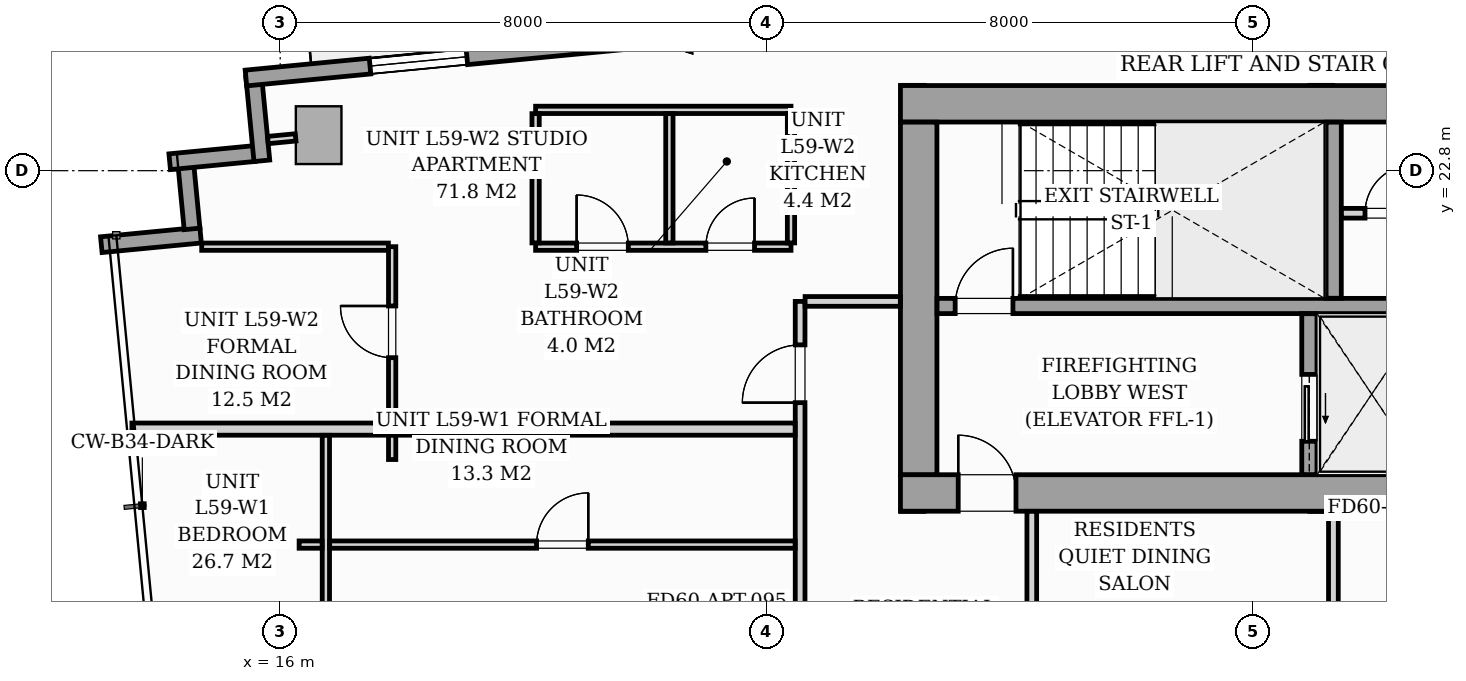
"""IFC4 building model, lengths in metres.
Left out: names, types, materials, properties, quantities, classifications, styles, units other than length and angle.
Written with IfcOpenShell. Run it as: python <this file> out.ifc"""

import sys

from ifc_helpers import new_model, si_unit, direction, frame, frame_2d, origin, origin_2d, place, context, subcontext, project, spatial, rectangle, i_section, extrude, source, transform, mapped, element, fill, save


model = new_model("IFC4")
c1 = context("Model", 3, precision=1e-05, world=origin(), true_north=direction((0.0, 1.0)))
c2 = subcontext(c1, "Body", "Model", "MODEL_VIEW")
j1 = project(units=[si_unit("LENGTHUNIT", "METRE"), si_unit("PLANEANGLEUNIT", "RADIAN")], contexts=[c1])
p1 = place(None, origin())
s1 = spatial("IfcSite", under=j1, at=p1, CompositionType="ELEMENT")
p2 = place(p1, origin())
s2 = spatial("IfcBuilding", under=s1, at=p2, CompositionType="ELEMENT")
p3 = place(p2, frame((0.0, 0.0, 205.0)))
s3 = spatial("IfcBuildingStorey", under=s2, at=p3, CompositionType="ELEMENT", Elevation=205.0)
m1 = source(origin(), c2, "Body", "SweptSolid", [
    extrude(i_section(OverallWidth=0.416, OverallDepth=0.446, WebThickness=0.039, FlangeThickness=0.063, FilletRadius=0.018, at=origin_2d()), origin(), (0.0, 0.0, 1.0), 3.196),
])
for number, where, z_axis, x_axis in (
    (1, (26.4, 17.4, 0.002), (0.0, 0.0, 1.0), (1.0, 0.0, 0.0)),
    (2, (33.12, 17.4, 0.002), (0.0, 0.0, 1.0), (1.0, 0.0, 0.0)),
    (3, (26.4, 24.0, 0.002), (0.0, 0.0, 1.0), (1.0, 0.0, 0.0)),
    (4, (33.12, 24.0, 0.002), (0.0, 0.0, 1.0), (1.0, 0.0, 0.0)),
):
    element("IfcColumn", number, at=place(p3, frame(where, z_axis=z_axis, x_axis=x_axis)), inside=s3, PredefinedType="PILASTER", context=c2, shape_type="MappedRepresentation", body=[
        mapped(m1, transform((0.0, 0.0, 0.0), scale=1.0)),
    ])
m2 = source(origin(), c2, "Body", "SweptSolid", [
    extrude(rectangle(XDim=0.75, YDim=0.95, at=origin_2d()), origin(), (0.0, 0.0, 1.0), 3.196),
])
p4 = place(p3, frame((16.632, 23.384, 0.002), z_axis=(0.0, 0.0, 1.0), x_axis=(0.995396198367, 0.09584575252, 0.0)))
e5 = element("IfcColumn", 5, at=p4, inside=s3, PredefinedType="COLUMN", context=c2, shape_type="MappedRepresentation", body=[
    mapped(m2, transform((0.0, 0.0, 0.0), scale=1.0)),
])
p5 = place(p3, frame((13.058, 21.583, 0.0), z_axis=(0.0, 0.0, 1.0), x_axis=(0.995394563142, 0.095862733462, 0.0)))
e6 = element("IfcWall", 6, at=p5, inside=s3, PredefinedType="STANDARD", context=c2, shape_type="SweptSolid", body=[
    extrude(rectangle(XDim=1.64, YDim=0.26, at=frame_2d((0.82, 0.0))), origin(), (0.0, 0.0, 1.0), 2.94),
])
p6 = place(p3, frame((14.55, 21.843, 0.0), z_axis=(0.0, 0.0, 1.0), x_axis=(-0.09576095695, 0.995404359607, 0.0)))
e7 = element("IfcWall", 7, at=p6, inside=s3, PredefinedType="STANDARD", context=c2, shape_type="SweptSolid", body=[
    extrude(rectangle(XDim=1.15, YDim=0.26, at=frame_2d((0.575, 0.0))), origin(), (0.0, 0.0, 1.0), 2.94),
])
p7 = place(p3, frame((14.183, 22.947, 0.0), z_axis=(0.0, 0.0, 1.0), x_axis=(0.99540614245, 0.095742423056, 0.0)))
e8 = element("IfcWall", 8, at=p7, inside=s3, PredefinedType="STANDARD", context=c2, shape_type="SweptSolid", body=[
    extrude(rectangle(XDim=1.395, YDim=0.26, at=frame_2d((0.697, 0.0))), origin(), (0.0, 0.0, 1.0), 2.94),
])
p8 = place(p3, frame((15.698, 22.963, 0.0), z_axis=(0.0, 0.0, 1.0), x_axis=(-0.09589913835, 0.995391056452, 0.0)))
e9 = element("IfcWall", 9, at=p8, inside=s3, PredefinedType="STANDARD", context=c2, shape_type="SweptSolid", body=[
    extrude(rectangle(XDim=1.395, YDim=0.26, at=frame_2d((0.698, 0.0))), origin(), (0.0, 0.0, 1.0), 2.94),
])
p9 = place(p3, frame((15.437, 24.324, 0.0), z_axis=(0.0, 0.0, 1.0), x_axis=(0.995395627913, 0.095851676732, 0.0)))
e10 = element("IfcWall", 10, at=p9, inside=s3, PredefinedType="STANDARD", context=c2, shape_type="SweptSolid", body=[
    extrude(rectangle(XDim=16.1, YDim=0.26, at=frame_2d((8.05, 0.0))), origin(), (0.0, 0.0, 1.0), 2.94),
])
p10 = place(p9, frame((6.749, 0.0, 0.0)))
e11 = element("IfcOpeningElement", 11, at=p10, cuts=e10, PredefinedType="OPENING", context=c2, shape_type="SweptSolid", body=[
    extrude(rectangle(XDim=1.8, YDim=2.06, at=frame_2d((0.9, 1.03))), frame((0.0, 0.14, 0.0), z_axis=(0.0, -1.0, 0.0), x_axis=(1.0, 0.0, 0.0)), (0.0, 0.0, 1.0), 0.28),
])
p11 = place(p9, frame((2.05, 0.0, 0.65)))
e12 = element("IfcOpeningElement", 12, at=p11, cuts=e10, PredefinedType="OPENING", context=c2, shape_type="SweptSolid", body=[
    extrude(rectangle(XDim=1.6, YDim=1.5, at=frame_2d((0.8, 0.75))), frame((0.0, 0.14, 0.0), z_axis=(0.0, -1.0, 0.0), x_axis=(1.0, 0.0, 0.0)), (0.0, 0.0, 1.0), 0.28),
])
p12 = place(p3, frame((26.2, 17.5, 0.0), z_axis=(0.0, 0.0, 1.0), x_axis=(1.0, 0.0, 0.0)))
e13 = element("IfcWall", 13, at=p12, inside=s3, PredefinedType="SHEAR", context=c2, shape_type="SweptSolid", body=[
    extrude(rectangle(XDim=19.6, YDim=0.6, at=frame_2d((9.8, 0.0))), origin(), (0.0, 0.0, 1.0), 3.2),
])
p13 = place(p12, frame((0.95, 0.0, 0.0)))
e14 = element("IfcOpeningElement", 14, at=p13, cuts=e13, PredefinedType="OPENING", context=c2, shape_type="SweptSolid", body=[
    extrude(rectangle(XDim=0.95, YDim=2.06, at=frame_2d((0.475, 1.03))), frame((0.0, 0.31, 0.0), z_axis=(0.0, -1.0, 0.0), x_axis=(1.0, 0.0, 0.0)), (0.0, 0.0, 1.0), 0.62),
])
p14 = place(p12, frame((9.38, 0.0, 0.0)))
e15 = element("IfcOpeningElement", 15, at=p14, cuts=e13, PredefinedType="OPENING", context=c2, shape_type="SweptSolid", body=[
    extrude(rectangle(XDim=0.85, YDim=2.0, at=frame_2d((0.425, 1.0))), frame((0.0, 0.31, 0.0), z_axis=(0.0, -1.0, 0.0), x_axis=(1.0, 0.0, 0.0)), (0.0, 0.0, 1.0), 0.62),
])
p15 = place(p12, frame((17.55, 0.0, 0.0)))
e16 = element("IfcOpeningElement", 16, at=p15, cuts=e13, PredefinedType="OPENING", context=c2, shape_type="SweptSolid", body=[
    extrude(rectangle(XDim=0.95, YDim=2.06, at=frame_2d((0.475, 1.03))), frame((0.0, 0.31, 0.0), z_axis=(0.0, -1.0, 0.0), x_axis=(1.0, 0.0, 0.0)), (0.0, 0.0, 1.0), 0.62),
])
p16 = place(p3, frame((26.2, 23.9, 0.0), z_axis=(0.0, 0.0, 1.0), x_axis=(1.0, 0.0, 0.0)))
e17 = element("IfcWall", 17, at=p16, inside=s3, PredefinedType="SHEAR", context=c2, shape_type="SweptSolid", body=[
    extrude(rectangle(XDim=19.6, YDim=0.6, at=frame_2d((9.8, 0.0))), origin(), (0.0, 0.0, 1.0), 3.2),
])
p17 = place(p3, frame((26.5, 17.802, 0.0), z_axis=(0.0, 0.0, 1.0), x_axis=(0.0, 1.0, 0.0)))
e18 = element("IfcWall", 18, at=p17, inside=s3, PredefinedType="SHEAR", context=c2, shape_type="SweptSolid", body=[
    extrude(rectangle(XDim=5.796, YDim=0.6, at=frame_2d((2.898, 0.0))), origin(), (0.0, 0.0, 1.0), 3.2),
])
p18 = place(p3, frame((26.802, 20.575, 0.0), z_axis=(0.0, 0.0, 1.0), x_axis=(1.0, 0.0, 0.0)))
e19 = element("IfcWall", 19, at=p18, inside=s3, PredefinedType="SOLIDWALL", context=c2, shape_type="SweptSolid", body=[
    extrude(rectangle(XDim=8.148, YDim=0.25, at=frame_2d((4.074, 0.0))), origin(), (0.0, 0.0, 1.0), 3.2),
])
p19 = place(p18, frame((0.298, 0.0, 0.0)))
e20 = element("IfcOpeningElement", 20, at=p19, cuts=e19, PredefinedType="OPENING", context=c2, shape_type="SweptSolid", body=[
    extrude(rectangle(XDim=0.95, YDim=2.06, at=frame_2d((0.475, 1.03))), frame((0.0, 0.135, 0.0), z_axis=(0.0, -1.0, 0.0), x_axis=(1.0, 0.0, 0.0)), (0.0, 0.0, 1.0), 0.27),
])
p20 = place(p3, frame((33.325, 20.702, 0.0), z_axis=(0.0, 0.0, 1.0), x_axis=(0.0, 1.0, 0.0)))
e21 = element("IfcWall", 21, at=p20, inside=s3, PredefinedType="SOLIDWALL", context=c2, shape_type="SweptSolid", body=[
    extrude(rectangle(XDim=2.896, YDim=0.25, at=frame_2d((1.448, 0.0))), origin(), (0.0, 0.0, 1.0), 3.2),
])
p21 = place(p3, frame((32.925, 17.802, 0.0), z_axis=(0.0, 0.0, 1.0), x_axis=(0.0, 1.0, 0.0)))
e22 = element("IfcWall", 22, at=p21, inside=s3, PredefinedType="SOLIDWALL", context=c2, shape_type="SweptSolid", body=[
    extrude(rectangle(XDim=2.646, YDim=0.25, at=frame_2d((1.323, 0.0))), origin(), (0.0, 0.0, 1.0), 3.2),
])
p22 = place(p21, frame((0.548, 0.0, 0.0)))
e23 = element("IfcOpeningElement", 23, at=p22, cuts=e22, PredefinedType="OPENING", context=c2, shape_type="SweptSolid", body=[
    extrude(rectangle(XDim=1.1, YDim=2.08, at=frame_2d((0.55, 1.04))), frame((0.0, 0.135, 0.0), z_axis=(0.0, -1.0, 0.0), x_axis=(1.0, 0.0, 0.0)), (0.0, 0.0, 1.0), 0.27),
])
p23 = place(p3, frame((33.452, 22.1, 0.0), z_axis=(0.0, 0.0, 1.0), x_axis=(1.0, 0.0, 0.0)))
e24 = element("IfcWall", 24, at=p23, inside=s3, PredefinedType="PARTITIONING", context=c2, shape_type="SweptSolid", body=[
    extrude(rectangle(XDim=5.096, YDim=0.16, at=frame_2d((2.548, 0.0))), origin(), (0.0, 0.0, 1.0), 2.94),
])
p24 = place(p23, frame((0.388, 0.0, 0.0)))
e25 = element("IfcOpeningElement", 25, at=p24, cuts=e24, PredefinedType="OPENING", context=c2, shape_type="SweptSolid", body=[
    extrude(rectangle(XDim=0.8, YDim=2.05, at=frame_2d((0.4, 1.025))), frame((0.0, 0.09, 0.0), z_axis=(0.0, -1.0, 0.0), x_axis=(1.0, 0.0, 0.0)), (0.0, 0.0, 1.0), 0.18),
])
p25 = place(p23, frame((2.148, 0.0, 0.0)))
e26 = element("IfcOpeningElement", 26, at=p25, cuts=e24, PredefinedType="OPENING", context=c2, shape_type="SweptSolid", body=[
    extrude(rectangle(XDim=0.8, YDim=2.05, at=frame_2d((0.4, 1.025))), frame((0.0, 0.09, 0.0), z_axis=(0.0, -1.0, 0.0), x_axis=(1.0, 0.0, 0.0)), (0.0, 0.0, 1.0), 0.18),
])
p26 = place(p23, frame((3.908, 0.0, 0.0)))
e27 = element("IfcOpeningElement", 27, at=p26, cuts=e24, PredefinedType="OPENING", context=c2, shape_type="SweptSolid", body=[
    extrude(rectangle(XDim=0.8, YDim=2.05, at=frame_2d((0.4, 1.025))), frame((0.0, 0.09, 0.0), z_axis=(0.0, -1.0, 0.0), x_axis=(1.0, 0.0, 0.0)), (0.0, 0.0, 1.0), 0.18),
])
p27 = place(p3, frame((24.55, 13.362, 0.0), z_axis=(0.0, 0.0, 1.0), x_axis=(0.0, 1.0, 0.0)))
e28 = element("IfcWall", 28, at=p27, inside=s3, PredefinedType="PARTITIONING", context=c2, shape_type="SweptSolid", body=[
    extrude(rectangle(XDim=7.288, YDim=0.16, at=frame_2d((3.644, 0.0))), origin(), (0.0, 0.0, 1.0), 2.94),
])
p28 = place(p27, frame((0.493, 0.0, 0.0)))
e29 = element("IfcOpeningElement", 29, at=p28, cuts=e28, PredefinedType="OPENING", context=c2, shape_type="SweptSolid", body=[
    extrude(rectangle(XDim=0.95, YDim=2.06, at=frame_2d((0.475, 1.03))), frame((0.0, 0.09, 0.0), z_axis=(0.0, -1.0, 0.0), x_axis=(1.0, 0.0, 0.0)), (0.0, 0.0, 1.0), 0.18),
])
p29 = place(p27, frame((5.623, 0.0, 0.0)))
e30 = element("IfcOpeningElement", 30, at=p29, cuts=e28, PredefinedType="OPENING", context=c2, shape_type="SweptSolid", body=[
    extrude(rectangle(XDim=0.95, YDim=2.06, at=frame_2d((0.475, 1.03))), frame((0.0, 0.09, 0.0), z_axis=(0.0, -1.0, 0.0), x_axis=(1.0, 0.0, 0.0)), (0.0, 0.0, 1.0), 0.18),
])
p30 = place(p3, frame((24.632, 20.65, 0.0), z_axis=(0.0, 0.0, 1.0), x_axis=(1.0, 0.0, 0.0)))
e31 = element("IfcWall", 31, at=p30, inside=s3, PredefinedType="PARTITIONING", context=c2, shape_type="SweptSolid", body=[
    extrude(rectangle(XDim=1.566, YDim=0.16, at=frame_2d((0.783, 0.0))), origin(), (0.0, 0.0, 1.0), 2.94),
])
p31 = place(p3, frame((13.561, 18.55, 0.0), z_axis=(0.0, 0.0, 1.0), x_axis=(1.0, 0.0, 0.0)))
e32 = element("IfcWall", 32, at=p31, inside=s3, PredefinedType="PARTITIONING", context=c2, shape_type="SweptSolid", body=[
    extrude(rectangle(XDim=10.907, YDim=0.2, at=frame_2d((5.453, 0.0))), origin(), (0.0, 0.0, 1.0), 2.94),
])
p32 = place(p3, frame((16.751, 7.615, 0.0), z_axis=(0.0, 0.0, 1.0), x_axis=(0.0, 1.0, 0.0)))
e33 = element("IfcWall", 33, at=p32, inside=s3, PredefinedType="PARTITIONING", context=c2, shape_type="SweptSolid", body=[
    extrude(rectangle(XDim=10.833, YDim=0.12, at=frame_2d((5.417, 0.0))), origin(), (0.0, 0.0, 1.0), 2.94),
])
p33 = place(p32, frame((4.849, 0.0, 0.0)))
e34 = element("IfcOpeningElement", 34, at=p33, cuts=e33, PredefinedType="OPENING", context=c2, shape_type="SweptSolid", body=[
    extrude(rectangle(XDim=0.85, YDim=2.05, at=frame_2d((0.425, 1.025))), frame((0.0, 0.07, 0.0), z_axis=(0.0, -1.0, 0.0), x_axis=(1.0, 0.0, 0.0)), (0.0, 0.0, 1.0), 0.14),
])
p34 = place(p3, frame((16.311, 16.651, 0.0), z_axis=(0.0, 0.0, 1.0), x_axis=(1.0, 0.0, 0.0)))
e35 = element("IfcWall", 35, at=p34, inside=s3, PredefinedType="PARTITIONING", context=c2, shape_type="SweptSolid", body=[
    extrude(rectangle(XDim=0.378, YDim=0.12, at=frame_2d((0.189, 0.0))), origin(), (0.0, 0.0, 1.0), 2.94),
])
p35 = place(p3, frame((16.813, 16.651, 0.0), z_axis=(0.0, 0.0, 1.0), x_axis=(1.0, 0.0, 0.0)))
e36 = element("IfcWall", 36, at=p35, inside=s3, PredefinedType="PARTITIONING", context=c2, shape_type="SweptSolid", body=[
    extrude(rectangle(XDim=7.655, YDim=0.12, at=frame_2d((3.828, 0.0))), origin(), (0.0, 0.0, 1.0), 2.281),
])
p36 = place(p35, frame((3.403, 0.0, 0.0)))
e37 = element("IfcOpeningElement", 37, at=p36, cuts=e36, PredefinedType="OPENING", context=c2, shape_type="SweptSolid", body=[
    extrude(rectangle(XDim=0.85, YDim=2.05, at=frame_2d((0.425, 1.025))), frame((0.0, 0.07, 0.0), z_axis=(0.0, -1.0, 0.0), x_axis=(1.0, 0.0, 0.0)), (0.0, 0.0, 1.0), 0.14),
])
p37 = place(p3, frame((20.2, 21.55, 0.0), z_axis=(0.0, 0.0, 1.0), x_axis=(1.0, 0.0, 0.0)))
e38 = element("IfcWall", 38, at=p37, inside=s3, PredefinedType="PARTITIONING", context=c2, shape_type="SweptSolid", body=[
    extrude(rectangle(XDim=4.2, YDim=0.12, at=frame_2d((2.1, 0.0))), origin(), (0.0, 0.0, 1.0), 2.94),
])
p38 = place(p37, frame((0.675, 0.0, 0.0)))
e39 = element("IfcOpeningElement", 39, at=p38, cuts=e38, PredefinedType="OPENING", context=c2, shape_type="SweptSolid", body=[
    extrude(rectangle(XDim=0.85, YDim=2.05, at=frame_2d((0.425, 1.025))), frame((0.0, 0.07, 0.0), z_axis=(0.0, -1.0, 0.0), x_axis=(1.0, 0.0, 0.0)), (0.0, 0.0, 1.0), 0.14),
])
p39 = place(p37, frame((2.8, 0.0, 0.0)))
e40 = element("IfcOpeningElement", 40, at=p39, cuts=e38, PredefinedType="OPENING", context=c2, shape_type="SweptSolid", body=[
    extrude(rectangle(XDim=0.8, YDim=2.02, at=frame_2d((0.4, 1.01))), frame((0.0, 0.07, 0.0), z_axis=(0.0, -1.0, 0.0), x_axis=(1.0, 0.0, 0.0)), (0.0, 0.0, 1.0), 0.14),
])
p40 = place(p3, frame((20.2, 23.8, 0.0), z_axis=(0.0, 0.0, 1.0), x_axis=(1.0, 0.0, 0.0)))
e41 = element("IfcWall", 41, at=p40, inside=s3, PredefinedType="PARTITIONING", context=c2, shape_type="SweptSolid", body=[
    extrude(rectangle(XDim=4.2, YDim=0.12, at=frame_2d((2.1, 0.0))), origin(), (0.0, 0.0, 1.0), 2.3),
])
for number, where, z_axis, x_axis in (
    (42, (20.2, 21.612, 0.0), (0.0, 0.0, 1.0), (0.0, 1.0, 0.0)),
    (43, (22.4, 21.612, 0.0), (0.0, 0.0, 1.0), (0.0, 1.0, 0.0)),
    (44, (24.4, 21.612, 0.0), (0.0, 0.0, 1.0), (0.0, 1.0, 0.0)),
):
    element("IfcWall", number, at=place(p3, frame(where, z_axis=z_axis, x_axis=x_axis)), inside=s3, PredefinedType="PARTITIONING", context=c2, shape_type="SweptSolid", body=[
        extrude(rectangle(XDim=2.126, YDim=0.12, at=frame_2d((1.063, 0.0))), origin(), (0.0, 0.0, 1.0), 2.94),
    ])
p41 = place(p3, frame((17.841, 18.05, 0.0), z_axis=(0.0, 0.0, 1.0), x_axis=(0.0, 1.0, 0.0)))
e45 = element("IfcWall", 45, at=p41, inside=s3, PredefinedType="PARTITIONING", context=c2, shape_type="SweptSolid", body=[
    extrude(rectangle(XDim=0.398, YDim=0.12, at=frame_2d((0.199, 0.0))), origin(), (0.0, 0.0, 1.0), 2.94),
])
p42 = place(p3, frame((17.841, 18.652, 0.0), z_axis=(0.0, 0.0, 1.0), x_axis=(0.0, 1.0, 0.0)))
e46 = element("IfcWall", 46, at=p42, inside=s3, PredefinedType="PARTITIONING", context=c2, shape_type="SweptSolid", body=[
    extrude(rectangle(XDim=2.898, YDim=0.12, at=frame_2d((1.449, 0.0))), origin(), (0.0, 0.0, 1.0), 2.94),
])
p43 = place(p42, frame((1.073, 0.0, 0.0)))
e47 = element("IfcOpeningElement", 47, at=p43, cuts=e46, PredefinedType="OPENING", context=c2, shape_type="SweptSolid", body=[
    extrude(rectangle(XDim=0.85, YDim=2.05, at=frame_2d((0.425, 1.025))), frame((0.0, 0.07, 0.0), z_axis=(0.0, -1.0, 0.0), x_axis=(1.0, 0.0, 0.0)), (0.0, 0.0, 1.0), 0.14),
])
p44 = place(p3, frame((14.709, 21.55, 0.0), z_axis=(0.0, 0.0, 1.0), x_axis=(1.0, 0.0, 0.0)))
e48 = element("IfcWall", 48, at=p44, inside=s3, PredefinedType="PARTITIONING", context=c2, shape_type="SweptSolid", body=[
    extrude(rectangle(XDim=3.07, YDim=0.12, at=frame_2d((1.535, 0.0))), origin(), (0.0, 0.0, 1.0), 2.94),
])
for number, where, z_axis, x_axis in (
    (49, (28.36, 14.7, 0.0), (0.0, 0.0, 1.0), (0.0, 1.0, 0.0)),
    (50, (33.32, 14.7, 0.0), (0.0, 0.0, 1.0), (0.0, 1.0, 0.0)),
):
    element("IfcWall", number, at=place(p3, frame(where, z_axis=z_axis, x_axis=x_axis)), inside=s3, PredefinedType="PARTITIONING", context=c2, shape_type="SweptSolid", body=[
        extrude(rectangle(XDim=2.498, YDim=0.16, at=frame_2d((1.249, 0.0))), origin(), (0.0, 0.0, 1.0), 2.94),
    ])
p45 = place(p3, frame((16.254, 23.348, 0.0), z_axis=(0.0, 0.0, 1.0), x_axis=(-0.995384576284, -0.09596637586, 0.0)))
e51 = element("IfcWall", 51, at=p45, inside=s3, PredefinedType="PARTITIONING", context=c2, shape_type="SweptSolid", body=[
    extrude(rectangle(XDim=0.458, YDim=0.12, at=frame_2d((0.229, 0.0))), origin(), (0.0, 0.0, 1.0), 2.94),
])
m3 = source(origin(), c2, "Body", "SweptSolid", [
    extrude(rectangle(XDim=1.6, YDim=1.5, at=frame_2d((0.8, 0.75))), frame((0.0, 0.03, 0.0), z_axis=(0.0, -1.0, 0.0), x_axis=(1.0, 0.0, 0.0)), (0.0, 0.0, 1.0), 0.06),
])
p46 = place(p11, origin())
e52 = element("IfcWindow", 52, at=p46, inside=s3, PartitioningType="SINGLE_PANEL", PredefinedType="WINDOW", context=c2, shape_type="MappedRepresentation", body=[
    mapped(m3, transform((0.0, 0.0, 0.0), scale=1.0)),
])
fill(e12, e52)
m4 = source(origin(), c2, "Body", "SweptSolid", [
    extrude(rectangle(XDim=0.95, YDim=2.06, at=frame_2d((0.475, 1.03))), frame((0.0, 0.025, 0.0), z_axis=(0.0, -1.0, 0.0), x_axis=(1.0, 0.0, 0.0)), (0.0, 0.0, 1.0), 0.05),
])
p47 = place(p13, origin())
e53 = element("IfcDoor", 53, at=p47, inside=s3, OperationType="SINGLE_SWING_LEFT", PredefinedType="DOOR", context=c2, shape_type="MappedRepresentation", body=[
    mapped(m4, transform((0.0, 0.0, 0.0), scale=1.0)),
])
fill(e14, e53)
p48 = place(p19, origin())
e54 = element("IfcDoor", 54, at=p48, inside=s3, OperationType="SINGLE_SWING_RIGHT", PredefinedType="DOOR", context=c2, shape_type="MappedRepresentation", body=[
    mapped(m4, transform((0.0, 0.0, 0.0), scale=1.0)),
])
fill(e20, e54)
m5 = source(origin(), c2, "Body", "SweptSolid", [
    extrude(rectangle(XDim=1.1, YDim=2.08, at=frame_2d((0.55, 1.04))), frame((0.0, 0.025, 0.0), z_axis=(0.0, -1.0, 0.0), x_axis=(1.0, 0.0, 0.0)), (0.0, 0.0, 1.0), 0.05),
])
p49 = place(p22, origin())
e55 = element("IfcDoor", 55, at=p49, inside=s3, OperationType="SLIDING_TO_LEFT", PredefinedType="DOOR", context=c2, shape_type="MappedRepresentation", body=[
    mapped(m5, transform((0.0, 0.0, 0.0), scale=1.0)),
])
fill(e23, e55)
m6 = source(origin(), c2, "Body", "SweptSolid", [
    extrude(rectangle(XDim=0.8, YDim=2.05, at=frame_2d((0.4, 1.025))), frame((0.0, 0.025, 0.0), z_axis=(0.0, -1.0, 0.0), x_axis=(1.0, 0.0, 0.0)), (0.0, 0.0, 1.0), 0.05),
])
p50 = place(p24, origin())
e56 = element("IfcDoor", 56, at=p50, inside=s3, OperationType="SINGLE_SWING_RIGHT", PredefinedType="DOOR", context=c2, shape_type="MappedRepresentation", body=[
    mapped(m6, transform((0.0, 0.0, 0.0), scale=1.0)),
])
fill(e25, e56)
m7 = source(origin(), c2, "Body", "SweptSolid", [
    extrude(rectangle(XDim=0.85, YDim=2.05, at=frame_2d((0.425, 1.025))), frame((0.0, 0.025, 0.0), z_axis=(0.0, -1.0, 0.0), x_axis=(1.0, 0.0, 0.0)), (0.0, 0.0, 1.0), 0.05),
])
p51 = place(p36, origin())
e57 = element("IfcDoor", 57, at=p51, inside=s3, OperationType="SINGLE_SWING_RIGHT", PredefinedType="DOOR", context=c2, shape_type="MappedRepresentation", body=[
    mapped(m7, transform((0.0, 0.0, 0.0), scale=1.0)),
])
fill(e37, e57)
m8 = source(origin(), c2, "Body", "SweptSolid", [
    extrude(rectangle(XDim=0.95, YDim=2.06, at=frame_2d((0.475, 1.03))), frame((0.0, 0.025, 0.0), z_axis=(0.0, -1.0, 0.0), x_axis=(1.0, 0.0, 0.0)), (0.0, 0.0, 1.0), 0.05),
])
p52 = place(p29, origin())
e58 = element("IfcDoor", 58, at=p52, inside=s3, OperationType="SINGLE_SWING_LEFT", PredefinedType="DOOR", context=c2, shape_type="MappedRepresentation", body=[
    mapped(m8, transform((0.0, 0.0, 0.0), scale=1.0)),
])
fill(e30, e58)
p53 = place(p43, origin())
e59 = element("IfcDoor", 59, at=p53, inside=s3, OperationType="SINGLE_SWING_RIGHT", PredefinedType="DOOR", context=c2, shape_type="MappedRepresentation", body=[
    mapped(m7, transform((0.0, 0.0, 0.0), scale=1.0)),
])
fill(e47, e59)
p54 = place(p38, origin())
e60 = element("IfcDoor", 60, at=p54, inside=s3, OperationType="SINGLE_SWING_LEFT", PredefinedType="DOOR", context=c2, shape_type="MappedRepresentation", body=[
    mapped(m7, transform((0.0, 0.0, 0.0), scale=1.0)),
])
fill(e39, e60)
m9 = source(origin(), c2, "Body", "SweptSolid", [
    extrude(rectangle(XDim=0.8, YDim=2.02, at=frame_2d((0.4, 1.01))), frame((0.0, 0.025, 0.0), z_axis=(0.0, -1.0, 0.0), x_axis=(1.0, 0.0, 0.0)), (0.0, 0.0, 1.0), 0.05),
])
p55 = place(p39, origin())
e61 = element("IfcDoor", 61, at=p55, inside=s3, OperationType="SINGLE_SWING_RIGHT", PredefinedType="DOOR", context=c2, shape_type="MappedRepresentation", body=[
    mapped(m9, transform((0.0, 0.0, 0.0), scale=1.0)),
])
fill(e40, e61)
save(model, sys.argv[1])
